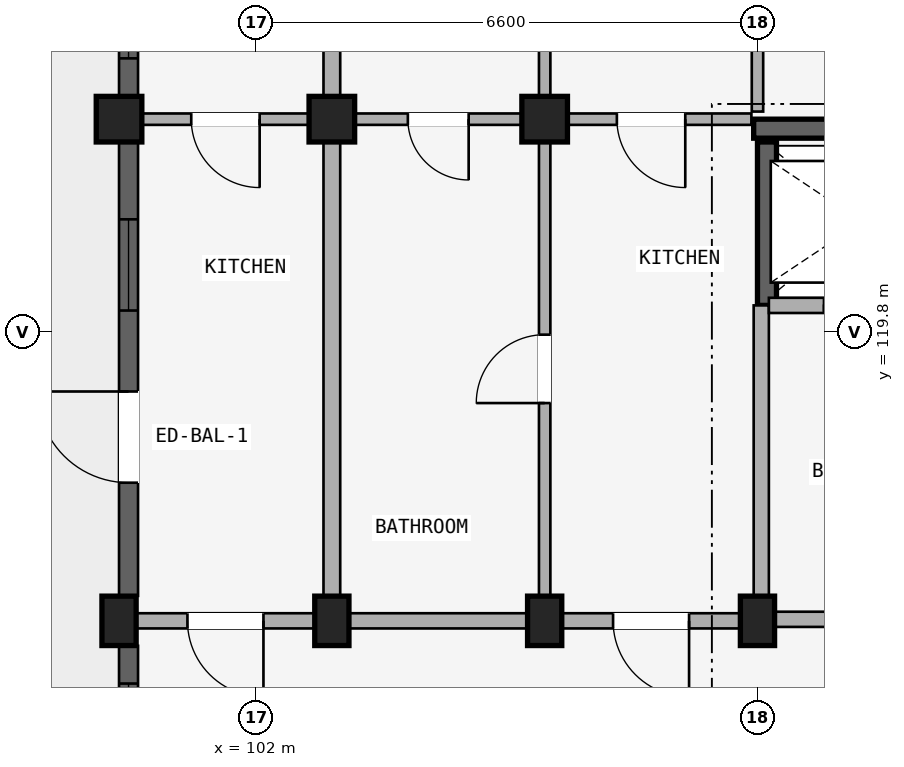
"""IFC4 building model, lengths in metres.
Left out: names, types, materials, properties, quantities, classifications, styles, units other than length and angle.
Written with IfcOpenShell. Run it as: python <this file> out.ifc"""

import sys

from ifc_helpers import new_model, si_unit, direction, frame, frame_2d, origin, origin_2d, place, context, subcontext, project, spatial, rectangle, extrude, element, fill, save


model = new_model("IFC4")
c1 = context("Model", 3, precision=1e-05, world=origin(), true_north=direction((0.0, 1.0)))
c2 = subcontext(c1, "Body", "Model", "MODEL_VIEW")
j1 = project(units=[si_unit("LENGTHUNIT", "METRE"), si_unit("PLANEANGLEUNIT", "RADIAN")], contexts=[c1])
p1 = place(None, origin())
s1 = spatial("IfcSite", under=j1, at=p1, CompositionType="ELEMENT")
p2 = place(p1, origin())
s2 = spatial("IfcBuilding", under=s1, at=p2, CompositionType="ELEMENT")
p3 = place(p2, frame((0.0, 0.0, 37.05)))
s3 = spatial("IfcBuildingStorey", under=s2, at=p3, CompositionType="ELEMENT", Elevation=37.05)
p4 = place(p3, frame((111.35, 122.475, 0.0), z_axis=(0.0, 0.0, 1.0), x_axis=(-1.0, 0.0, 0.0)))
e1 = element("IfcWall", 1, at=p4, inside=s3, PredefinedType="SHEAR", context=c2, shape_type="SweptSolid", body=[
    extrude(rectangle(XDim=2.8, YDim=0.25, at=frame_2d((1.4, 0.0))), origin(), (0.0, 0.0, 1.0), 2.93),
])
p5 = place(p3, frame((108.725, 120.15, 0.0), z_axis=(0.0, 0.0, 1.0), x_axis=(0.0, 1.0, 0.0)))
e2 = element("IfcWall", 2, at=p5, inside=s3, PredefinedType="SHEAR", context=c2, shape_type="SweptSolid", body=[
    extrude(rectangle(XDim=2.15, YDim=0.25, at=frame_2d((1.075, 0.0))), origin(), (0.0, 0.0, 1.0), 2.93),
])
for number, where, z_axis, x_axis in (
    (3, (108.6, 116.0, 0.0), (0.0, 0.0, 1.0), (1.0, 0.0, 0.0)),
    (4, (105.8, 116.0, 0.0), (0.0, 0.0, 1.0), (1.0, 0.0, 0.0)),
):
    element("IfcColumn", number, at=place(p3, frame(where, z_axis=z_axis, x_axis=x_axis)), inside=s3, PredefinedType="COLUMN", context=c2, shape_type="SweptSolid", body=[
        extrude(rectangle(XDim=0.45, YDim=0.65, at=origin_2d()), origin(), (0.0, 0.0, 1.0), 2.93),
    ])
p6 = place(p3, frame((105.8, 122.6, 0.0), z_axis=(0.0, 0.0, 1.0), x_axis=(1.0, 0.0, 0.0)))
e5 = element("IfcColumn", 5, at=p6, inside=s3, PredefinedType="COLUMN", context=c2, shape_type="SweptSolid", body=[
    extrude(rectangle(XDim=0.6, YDim=0.6, at=origin_2d()), origin(), (0.0, 0.0, 1.0), 2.93),
])
p7 = place(p3, frame((103.0, 116.0, 0.0), z_axis=(0.0, 0.0, 1.0), x_axis=(1.0, 0.0, 0.0)))
e6 = element("IfcColumn", 6, at=p7, inside=s3, PredefinedType="COLUMN", context=c2, shape_type="SweptSolid", body=[
    extrude(rectangle(XDim=0.45, YDim=0.65, at=origin_2d()), origin(), (0.0, 0.0, 1.0), 2.93),
])
p8 = place(p3, frame((103.0, 122.6, 0.0), z_axis=(0.0, 0.0, 1.0), x_axis=(1.0, 0.0, 0.0)))
e7 = element("IfcColumn", 7, at=p8, inside=s3, PredefinedType="COLUMN", context=c2, shape_type="SweptSolid", body=[
    extrude(rectangle(XDim=0.6, YDim=0.6, at=origin_2d()), origin(), (0.0, 0.0, 1.0), 2.93),
])
p9 = place(p3, frame((100.2, 116.0, 0.0), z_axis=(0.0, 0.0, 1.0), x_axis=(1.0, 0.0, 0.0)))
e8 = element("IfcColumn", 8, at=p9, inside=s3, PredefinedType="COLUMN", context=c2, shape_type="SweptSolid", body=[
    extrude(rectangle(XDim=0.45, YDim=0.65, at=origin_2d()), origin(), (0.0, 0.0, 1.0), 2.93),
])
p10 = place(p3, frame((100.2, 122.6, 0.0), z_axis=(0.0, 0.0, 1.0), x_axis=(1.0, 0.0, 0.0)))
e9 = element("IfcColumn", 9, at=p10, inside=s3, PredefinedType="COLUMN", context=c2, shape_type="SweptSolid", body=[
    extrude(rectangle(XDim=0.6, YDim=0.6, at=origin_2d()), origin(), (0.0, 0.0, 1.0), 2.93),
])
p11 = place(p3, frame((114.3, 116.02, 0.0), z_axis=(0.0, 0.0, 1.0), x_axis=(-1.0, 0.0, 0.0)))
e10 = element("IfcWall", 10, at=p11, inside=s3, PredefinedType="STANDARD", context=c2, shape_type="SweptSolid", body=[
    extrude(rectangle(XDim=5.65, YDim=0.2, at=frame_2d((2.825, 0.0))), origin(), (0.0, 0.0, 1.0), 2.372),
])
p12 = place(p11, frame((1.923, 0.0, 0.0)))
e11 = element("IfcOpeningElement", 11, at=p12, cuts=e10, PredefinedType="OPENING", context=c2, shape_type="SweptSolid", body=[
    extrude(rectangle(XDim=1.24, YDim=2.15, at=frame_2d((0.62, 1.075))), frame((0.0, 0.11, 0.0), z_axis=(0.0, -1.0, 0.0), x_axis=(1.0, 0.0, 0.0)), (0.0, 0.0, 1.0), 0.22),
])
p13 = place(p3, frame((108.65, 116.02, 0.0), z_axis=(0.0, 0.0, 1.0), x_axis=(0.0, 1.0, 0.0)))
e12 = element("IfcWall", 12, at=p13, inside=s3, PredefinedType="STANDARD", context=c2, shape_type="SweptSolid", body=[
    extrude(rectangle(XDim=4.13, YDim=0.2, at=frame_2d((2.065, 0.0))), origin(), (0.0, 0.0, 1.0), 2.372),
])
p14 = place(p3, frame((111.3, 120.15, 0.0), z_axis=(0.0, 0.0, 1.0), x_axis=(-1.0, 0.0, 0.0)))
e13 = element("IfcWall", 13, at=p14, inside=s3, PredefinedType="STANDARD", context=c2, shape_type="SweptSolid", body=[
    extrude(rectangle(XDim=2.55, YDim=0.2, at=frame_2d((1.275, 0.0))), origin(), (0.0, 0.0, 1.0), 2.372),
])
p15 = place(p14, frame((0.725, 0.0, 0.0)))
e14 = element("IfcOpeningElement", 14, at=p15, cuts=e13, PredefinedType="OPENING", context=c2, shape_type="SweptSolid", body=[
    extrude(rectangle(XDim=1.1, YDim=2.15, at=frame_2d((0.55, 1.075))), frame((0.0, 0.11, 0.0), z_axis=(0.0, -1.0, 0.0), x_axis=(1.0, 0.0, 0.0)), (0.0, 0.0, 1.0), 0.22),
])
p16 = place(p3, frame((108.6, 116.0, 0.0), z_axis=(0.0, 0.0, 1.0), x_axis=(-1.0, 0.0, 0.0)))
e15 = element("IfcWall", 15, at=p16, inside=s3, PredefinedType="STANDARD", context=c2, shape_type="SweptSolid", body=[
    extrude(rectangle(XDim=2.8, YDim=0.2, at=frame_2d((1.4, 0.0))), origin(), (0.0, 0.0, 1.0), 2.372),
])
p17 = place(p16, frame((0.9, 0.0, 0.0)))
e16 = element("IfcOpeningElement", 16, at=p17, cuts=e15, PredefinedType="OPENING", context=c2, shape_type="SweptSolid", body=[
    extrude(rectangle(XDim=1.0, YDim=2.15, at=frame_2d((0.5, 1.075))), frame((0.0, 0.11, 0.0), z_axis=(0.0, -1.0, 0.0), x_axis=(1.0, 0.0, 0.0)), (0.0, 0.0, 1.0), 0.22),
])
p18 = place(p3, frame((108.52, 122.6, 0.0), z_axis=(0.0, 0.0, 1.0), x_axis=(-1.0, 0.0, 0.0)))
e17 = element("IfcWall", 17, at=p18, inside=s3, PredefinedType="PLUMBINGWALL", context=c2, shape_type="SweptSolid", body=[
    extrude(rectangle(XDim=2.64, YDim=0.15, at=frame_2d((1.32, 0.0))), origin(), (0.0, 0.0, 1.0), 2.372),
])
p19 = place(p18, frame((0.87, 0.0, 0.0)))
e18 = element("IfcOpeningElement", 18, at=p19, cuts=e17, PredefinedType="OPENING", context=c2, shape_type="SweptSolid", body=[
    extrude(rectangle(XDim=0.9, YDim=2.1, at=frame_2d((0.45, 1.05))), frame((0.0, 0.085, 0.0), z_axis=(0.0, -1.0, 0.0), x_axis=(1.0, 0.0, 0.0)), (0.0, 0.0, 1.0), 0.17),
])
p20 = place(p3, frame((105.8, 116.0, 0.0), z_axis=(0.0, 0.0, 1.0), x_axis=(-1.0, 0.0, 0.0)))
e19 = element("IfcWall", 19, at=p20, inside=s3, PredefinedType="STANDARD", context=c2, shape_type="SweptSolid", body=[
    extrude(rectangle(XDim=2.8, YDim=0.2, at=frame_2d((1.4, 0.0))), origin(), (0.0, 0.0, 1.0), 2.372),
])
p21 = place(p3, frame((105.72, 122.6, 0.0), z_axis=(0.0, 0.0, 1.0), x_axis=(-1.0, 0.0, 0.0)))
e20 = element("IfcWall", 20, at=p21, inside=s3, PredefinedType="PLUMBINGWALL", context=c2, shape_type="SweptSolid", body=[
    extrude(rectangle(XDim=2.64, YDim=0.15, at=frame_2d((1.32, 0.0))), origin(), (0.0, 0.0, 1.0), 2.372),
])
p22 = place(p21, frame((0.92, 0.0, 0.0)))
e21 = element("IfcOpeningElement", 21, at=p22, cuts=e20, PredefinedType="OPENING", context=c2, shape_type="SweptSolid", body=[
    extrude(rectangle(XDim=0.8, YDim=2.1, at=frame_2d((0.4, 1.05))), frame((0.0, 0.085, 0.0), z_axis=(0.0, -1.0, 0.0), x_axis=(1.0, 0.0, 0.0)), (0.0, 0.0, 1.0), 0.17),
])
p23 = place(p3, frame((103.0, 116.0, 0.0), z_axis=(0.0, 0.0, 1.0), x_axis=(-1.0, 0.0, 0.0)))
e22 = element("IfcWall", 22, at=p23, inside=s3, PredefinedType="STANDARD", context=c2, shape_type="SweptSolid", body=[
    extrude(rectangle(XDim=2.8, YDim=0.2, at=frame_2d((1.4, 0.0))), origin(), (0.0, 0.0, 1.0), 2.372),
])
p24 = place(p23, frame((0.9, 0.0, 0.0)))
e23 = element("IfcOpeningElement", 23, at=p24, cuts=e22, PredefinedType="OPENING", context=c2, shape_type="SweptSolid", body=[
    extrude(rectangle(XDim=1.0, YDim=2.15, at=frame_2d((0.5, 1.075))), frame((0.0, 0.11, 0.0), z_axis=(0.0, -1.0, 0.0), x_axis=(1.0, 0.0, 0.0)), (0.0, 0.0, 1.0), 0.22),
])
p25 = place(p3, frame((102.92, 122.6, 0.0), z_axis=(0.0, 0.0, 1.0), x_axis=(-1.0, 0.0, 0.0)))
e24 = element("IfcWall", 24, at=p25, inside=s3, PredefinedType="PLUMBINGWALL", context=c2, shape_type="SweptSolid", body=[
    extrude(rectangle(XDim=2.64, YDim=0.15, at=frame_2d((1.32, 0.0))), origin(), (0.0, 0.0, 1.0), 2.372),
])
p26 = place(p25, frame((0.87, 0.0, 0.0)))
e25 = element("IfcOpeningElement", 25, at=p26, cuts=e24, PredefinedType="OPENING", context=c2, shape_type="SweptSolid", body=[
    extrude(rectangle(XDim=0.9, YDim=2.1, at=frame_2d((0.45, 1.05))), frame((0.0, 0.085, 0.0), z_axis=(0.0, -1.0, 0.0), x_axis=(1.0, 0.0, 0.0)), (0.0, 0.0, 1.0), 0.17),
])
p27 = place(p3, frame((108.6, 122.7, 0.0), z_axis=(0.0, 0.0, 1.0), x_axis=(0.0, 1.0, 0.0)))
e26 = element("IfcWall", 26, at=p27, inside=s3, PredefinedType="PARTITIONING", context=c2, shape_type="SweptSolid", body=[
    extrude(rectangle(XDim=2.42, YDim=0.15, at=frame_2d((1.21, 0.0))), origin(), (0.0, 0.0, 1.0), 2.372),
])
p28 = place(p27, frame((0.9, 0.0, 0.0)))
e27 = element("IfcOpeningElement", 27, at=p28, cuts=e26, PredefinedType="OPENING", context=c2, shape_type="SweptSolid", body=[
    extrude(rectangle(XDim=0.8, YDim=2.1, at=frame_2d((0.4, 1.05))), frame((0.0, 0.085, 0.0), z_axis=(0.0, -1.0, 0.0), x_axis=(1.0, 0.0, 0.0)), (0.0, 0.0, 1.0), 0.17),
])
p29 = place(p3, frame((105.8, 116.05, 0.0), z_axis=(0.0, 0.0, 1.0), x_axis=(0.0, 1.0, 0.0)))
e28 = element("IfcWall", 28, at=p29, inside=s3, PredefinedType="PARTITIONING", context=c2, shape_type="SweptSolid", body=[
    extrude(rectangle(XDim=6.53, YDim=0.15, at=frame_2d((3.265, 0.0))), origin(), (0.0, 0.0, 1.0), 2.372),
])
p30 = place(p29, frame((2.815, 0.0, 0.0)))
e29 = element("IfcOpeningElement", 29, at=p30, cuts=e28, PredefinedType="OPENING", context=c2, shape_type="SweptSolid", body=[
    extrude(rectangle(XDim=0.9, YDim=2.1, at=frame_2d((0.45, 1.05))), frame((0.0, 0.085, 0.0), z_axis=(0.0, -1.0, 0.0), x_axis=(1.0, 0.0, 0.0)), (0.0, 0.0, 1.0), 0.17),
])
p31 = place(p3, frame((105.8, 122.7, 0.0), z_axis=(0.0, 0.0, 1.0), x_axis=(0.0, 1.0, 0.0)))
e30 = element("IfcWall", 30, at=p31, inside=s3, PredefinedType="PARTITIONING", context=c2, shape_type="SweptSolid", body=[
    extrude(rectangle(XDim=2.42, YDim=0.15, at=frame_2d((1.21, 0.0))), origin(), (0.0, 0.0, 1.0), 2.372),
])
p32 = place(p31, frame((0.9, 0.0, 0.0)))
e31 = element("IfcOpeningElement", 31, at=p32, cuts=e30, PredefinedType="OPENING", context=c2, shape_type="SweptSolid", body=[
    extrude(rectangle(XDim=0.8, YDim=2.1, at=frame_2d((0.4, 1.05))), frame((0.0, 0.085, 0.0), z_axis=(0.0, -1.0, 0.0), x_axis=(1.0, 0.0, 0.0)), (0.0, 0.0, 1.0), 0.17),
])
p33 = place(p3, frame((103.0, 116.05, 0.0), z_axis=(0.0, 0.0, 1.0), x_axis=(0.0, 1.0, 0.0)))
e32 = element("IfcWall", 32, at=p33, inside=s3, PredefinedType="STANDARD", context=c2, shape_type="SweptSolid", body=[
    extrude(rectangle(XDim=6.53, YDim=0.22, at=frame_2d((3.265, 0.0))), origin(), (0.0, 0.0, 1.0), 2.372),
])
p34 = place(p3, frame((103.0, 122.7, 0.0), z_axis=(0.0, 0.0, 1.0), x_axis=(0.0, 1.0, 0.0)))
e33 = element("IfcWall", 33, at=p34, inside=s3, PredefinedType="STANDARD", context=c2, shape_type="SweptSolid", body=[
    extrude(rectangle(XDim=2.42, YDim=0.22, at=frame_2d((1.21, 0.0))), origin(), (0.0, 0.0, 1.0), 2.372),
])
p35 = place(p3, frame((100.325, 113.928, 0.0), z_axis=(0.0, 0.0, 1.0), x_axis=(0.0, 1.0, 0.0)))
e34 = element("IfcWall", 34, at=p35, inside=s3, PredefinedType="STANDARD", context=c2, shape_type="SweptSolid", body=[
    extrude(rectangle(XDim=1.743, YDim=0.25, at=frame_2d((0.872, 0.0))), origin(), (0.0, 0.0, 1.0), 2.372),
])
p36 = place(p35, frame((0.497, 0.0, 0.88)))
e35 = element("IfcOpeningElement", 35, at=p36, cuts=e34, PredefinedType="OPENING", context=c2, shape_type="SweptSolid", body=[
    extrude(rectangle(XDim=0.75, YDim=1.05, at=frame_2d((0.375, 0.525))), frame((0.0, 0.135, 0.0), z_axis=(0.0, -1.0, 0.0), x_axis=(1.0, 0.0, 0.0)), (0.0, 0.0, 1.0), 0.27),
])
p37 = place(p3, frame((100.325, 116.329, 0.0), z_axis=(0.0, 0.0, 1.0), x_axis=(0.0, 1.0, 0.0)))
e36 = element("IfcWall", 36, at=p37, inside=s3, PredefinedType="STANDARD", context=c2, shape_type="SweptSolid", body=[
    extrude(rectangle(XDim=5.968, YDim=0.25, at=frame_2d((2.984, 0.0))), origin(), (0.0, 0.0, 1.0), 2.372),
])
p38 = place(p37, frame((3.754, 0.0, 0.522)))
e37 = element("IfcOpeningElement", 37, at=p38, cuts=e36, PredefinedType="OPENING", context=c2, shape_type="SweptSolid", body=[
    extrude(rectangle(XDim=1.2, YDim=1.5, at=frame_2d((0.6, 0.75))), frame((0.0, 0.135, 0.0), z_axis=(0.0, -1.0, 0.0), x_axis=(1.0, 0.0, 0.0)), (0.0, 0.0, 1.0), 0.27),
])
p39 = place(p37, frame((1.489, 0.0, 0.0)))
e38 = element("IfcOpeningElement", 38, at=p39, cuts=e36, PredefinedType="OPENING", context=c2, shape_type="SweptSolid", body=[
    extrude(rectangle(XDim=1.2, YDim=2.15, at=frame_2d((0.6, 1.075))), frame((0.0, 0.135, 0.0), z_axis=(0.0, -1.0, 0.0), x_axis=(1.0, 0.0, 0.0)), (0.0, 0.0, 1.0), 0.27),
])
p40 = place(p3, frame((100.325, 122.904, 0.0), z_axis=(0.0, 0.0, 1.0), x_axis=(0.0, 1.0, 0.0)))
e39 = element("IfcWall", 39, at=p40, inside=s3, PredefinedType="STANDARD", context=c2, shape_type="SweptSolid", body=[
    extrude(rectangle(XDim=2.193, YDim=0.25, at=frame_2d((1.096, 0.0))), origin(), (0.0, 0.0, 1.0), 2.412),
])
p41 = place(p40, frame((0.497, 0.0, 0.712)))
e40 = element("IfcOpeningElement", 40, at=p41, cuts=e39, PredefinedType="OPENING", context=c2, shape_type="SweptSolid", body=[
    extrude(rectangle(XDim=1.2, YDim=1.5, at=frame_2d((0.6, 0.75))), frame((0.0, 0.135, 0.0), z_axis=(0.0, -1.0, 0.0), x_axis=(1.0, 0.0, 0.0)), (0.0, 0.0, 1.0), 0.27),
])
p42 = place(p36, origin())
e41 = element("IfcWindow", 41, at=p42, inside=s3, PartitioningType="SINGLE_PANEL", PredefinedType="WINDOW", context=c2, shape_type="SweptSolid", body=[
    extrude(rectangle(XDim=0.75, YDim=1.05, at=frame_2d((0.375, 0.525))), frame((0.0, 0.03, 0.0), z_axis=(0.0, -1.0, 0.0), x_axis=(1.0, 0.0, 0.0)), (0.0, 0.0, 1.0), 0.06),
])
fill(e35, e41)
p43 = place(p38, origin())
e42 = element("IfcWindow", 42, at=p43, inside=s3, PartitioningType="SINGLE_PANEL", PredefinedType="WINDOW", context=c2, shape_type="SweptSolid", body=[
    extrude(rectangle(XDim=1.2, YDim=1.5, at=frame_2d((0.6, 0.75))), frame((0.0, 0.03, 0.0), z_axis=(0.0, -1.0, 0.0), x_axis=(1.0, 0.0, 0.0)), (0.0, 0.0, 1.0), 0.06),
])
fill(e37, e42)
p44 = place(p41, origin())
e43 = element("IfcWindow", 43, at=p44, inside=s3, PartitioningType="SINGLE_PANEL", PredefinedType="WINDOW", context=c2, shape_type="SweptSolid", body=[
    extrude(rectangle(XDim=1.2, YDim=1.5, at=frame_2d((0.6, 0.75))), frame((0.0, 0.03, 0.0), z_axis=(0.0, -1.0, 0.0), x_axis=(1.0, 0.0, 0.0)), (0.0, 0.0, 1.0), 0.06),
])
fill(e40, e43)
p45 = place(p15, origin())
e44 = element("IfcDoor", 44, at=p45, inside=s3, OperationType="SLIDING_TO_LEFT", PredefinedType="DOOR", context=c2, shape_type="SweptSolid", body=[
    extrude(rectangle(XDim=1.1, YDim=2.15, at=frame_2d((0.55, 1.075))), frame((0.0, 0.025, 0.0), z_axis=(0.0, -1.0, 0.0), x_axis=(1.0, 0.0, 0.0)), (0.0, 0.0, 1.0), 0.05),
])
fill(e14, e44)
p46 = place(p19, frame((0.9, 0.0, 0.0), z_axis=(0.0, 0.0, 1.0), x_axis=(-1.0, 0.0, 0.0)))
e45 = element("IfcDoor", 45, at=p46, inside=s3, OperationType="SINGLE_SWING_RIGHT", PredefinedType="DOOR", context=c2, shape_type="SweptSolid", body=[
    extrude(rectangle(XDim=0.9, YDim=2.1, at=frame_2d((0.45, 1.05))), frame((0.0, 0.025, 0.0), z_axis=(0.0, -1.0, 0.0), x_axis=(1.0, 0.0, 0.0)), (0.0, 0.0, 1.0), 0.05),
])
fill(e18, e45)
p47 = place(p17, origin())
e46 = element("IfcDoor", 46, at=p47, inside=s3, OperationType="SINGLE_SWING_LEFT", PredefinedType="DOOR", context=c2, shape_type="SweptSolid", body=[
    extrude(rectangle(XDim=1.0, YDim=2.15, at=frame_2d((0.5, 1.075))), frame((0.0, 0.025, 0.0), z_axis=(0.0, -1.0, 0.0), x_axis=(1.0, 0.0, 0.0)), (0.0, 0.0, 1.0), 0.05),
])
fill(e16, e46)
p48 = place(p22, frame((0.8, 0.0, 0.0), z_axis=(0.0, 0.0, 1.0), x_axis=(-1.0, 0.0, 0.0)))
e47 = element("IfcDoor", 47, at=p48, inside=s3, OperationType="SINGLE_SWING_RIGHT", PredefinedType="DOOR", context=c2, shape_type="SweptSolid", body=[
    extrude(rectangle(XDim=0.8, YDim=2.1, at=frame_2d((0.4, 1.05))), frame((0.0, 0.025, 0.0), z_axis=(0.0, -1.0, 0.0), x_axis=(1.0, 0.0, 0.0)), (0.0, 0.0, 1.0), 0.05),
])
fill(e21, e47)
p49 = place(p26, frame((0.9, 0.0, 0.0), z_axis=(0.0, 0.0, 1.0), x_axis=(-1.0, 0.0, 0.0)))
e48 = element("IfcDoor", 48, at=p49, inside=s3, OperationType="SINGLE_SWING_RIGHT", PredefinedType="DOOR", context=c2, shape_type="SweptSolid", body=[
    extrude(rectangle(XDim=0.9, YDim=2.1, at=frame_2d((0.45, 1.05))), frame((0.0, 0.025, 0.0), z_axis=(0.0, -1.0, 0.0), x_axis=(1.0, 0.0, 0.0)), (0.0, 0.0, 1.0), 0.05),
])
fill(e25, e48)
p50 = place(p24, origin())
e49 = element("IfcDoor", 49, at=p50, inside=s3, OperationType="SINGLE_SWING_LEFT", PredefinedType="DOOR", context=c2, shape_type="SweptSolid", body=[
    extrude(rectangle(XDim=1.0, YDim=2.15, at=frame_2d((0.5, 1.075))), frame((0.0, 0.025, 0.0), z_axis=(0.0, -1.0, 0.0), x_axis=(1.0, 0.0, 0.0)), (0.0, 0.0, 1.0), 0.05),
])
fill(e23, e49)
p51 = place(p30, frame((0.9, 0.0, 0.0), z_axis=(0.0, 0.0, 1.0), x_axis=(-1.0, 0.0, 0.0)))
e50 = element("IfcDoor", 50, at=p51, inside=s3, OperationType="SINGLE_SWING_RIGHT", PredefinedType="DOOR", context=c2, shape_type="SweptSolid", body=[
    extrude(rectangle(XDim=0.9, YDim=2.1, at=frame_2d((0.45, 1.05))), frame((0.0, 0.025, 0.0), z_axis=(0.0, -1.0, 0.0), x_axis=(1.0, 0.0, 0.0)), (0.0, 0.0, 1.0), 0.05),
])
fill(e29, e50)
p52 = place(p39, origin())
e51 = element("IfcDoor", 51, at=p52, inside=s3, OperationType="SINGLE_SWING_RIGHT", PredefinedType="DOOR", context=c2, shape_type="SweptSolid", body=[
    extrude(rectangle(XDim=1.2, YDim=2.15, at=frame_2d((0.6, 1.075))), frame((0.0, 0.025, 0.0), z_axis=(0.0, -1.0, 0.0), x_axis=(1.0, 0.0, 0.0)), (0.0, 0.0, 1.0), 0.05),
])
fill(e38, e51)
save(model, sys.argv[1])
